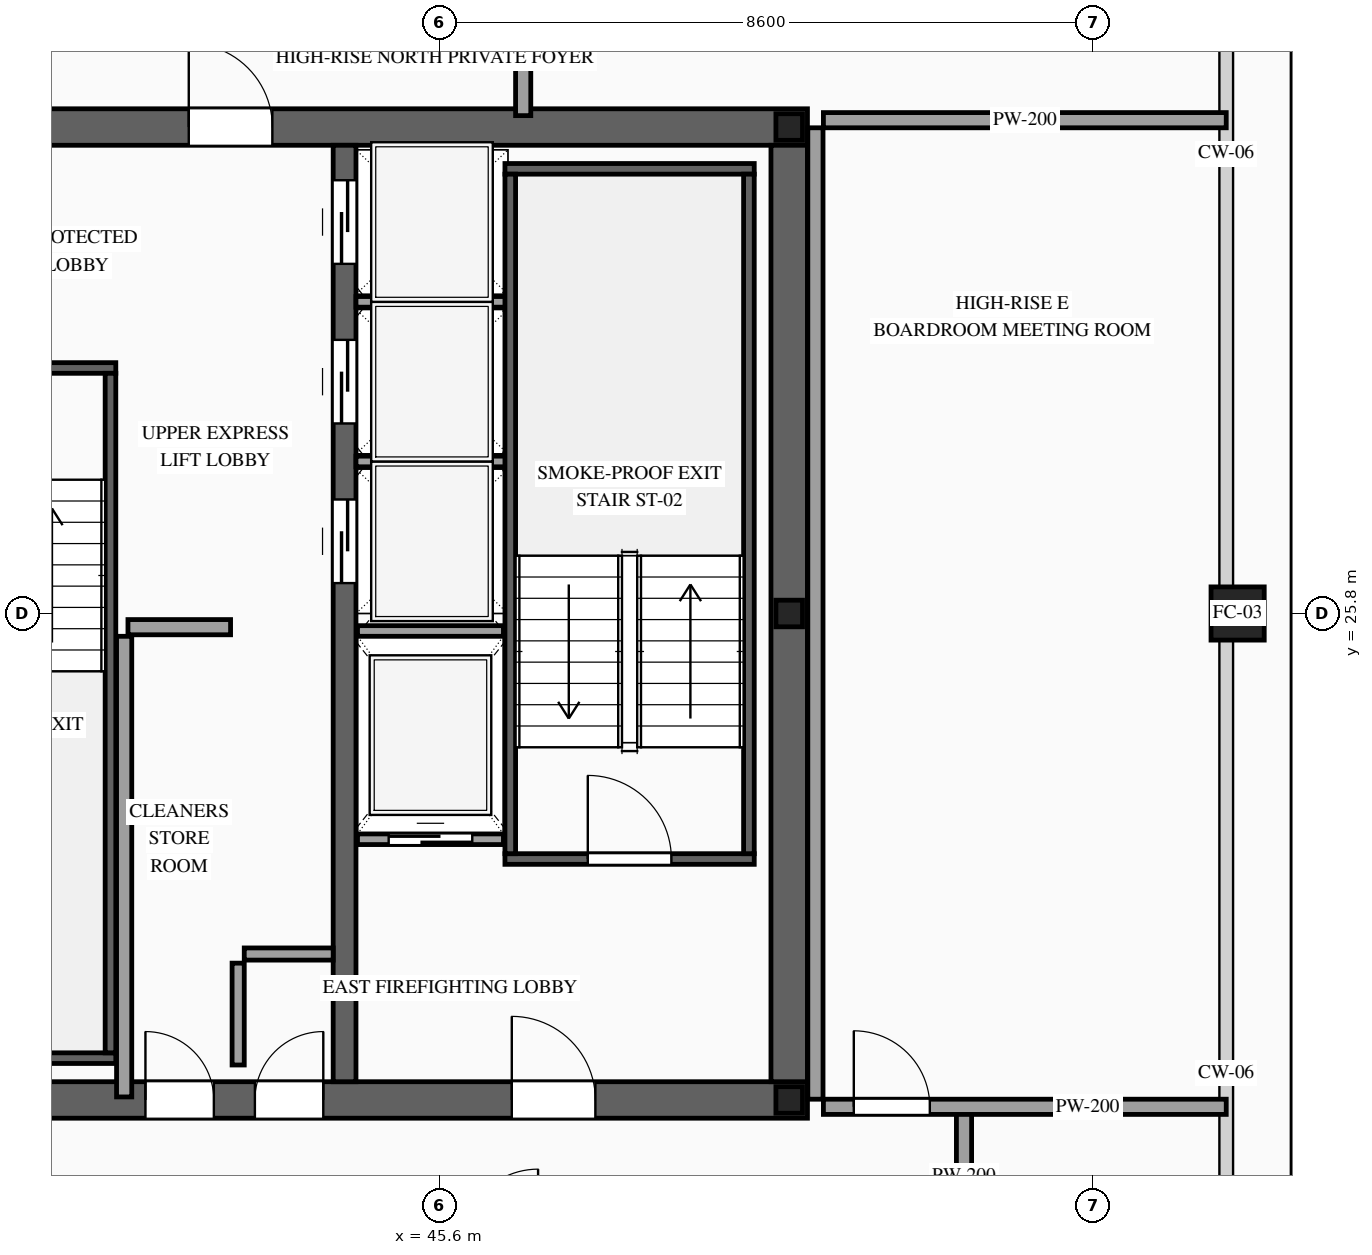
"""IFC4 building model, lengths in metres.
Left out: names, types, materials, properties, quantities, classifications, styles, units other than length and angle.
Written with IfcOpenShell. Run it as: python <this file> out.ifc"""

import sys

from ifc_helpers import new_model, si_unit, direction, frame, frame_2d, origin, origin_2d, place, context, subcontext, project, spatial, rectangle, hollow_rectangle, i_section, extrude, source, transform, mapped, element, fill, save


model = new_model("IFC4")
c1 = context("Model", 3, precision=1e-05, world=origin(), true_north=direction((0.0, 1.0)))
c2 = subcontext(c1, "Body", "Model", "MODEL_VIEW")
j1 = project(units=[si_unit("LENGTHUNIT", "METRE"), si_unit("PLANEANGLEUNIT", "RADIAN")], contexts=[c1])
p1 = place(None, origin())
s1 = spatial("IfcSite", under=j1, at=p1, CompositionType="ELEMENT")
p2 = place(p1, origin())
s2 = spatial("IfcBuilding", under=s1, at=p2, CompositionType="ELEMENT")
p3 = place(p2, frame((0.0, 0.0, 321.7)))
s3 = spatial("IfcBuildingStorey", under=s2, at=p3, CompositionType="ELEMENT", Elevation=321.7)
p4 = place(p3, frame((23.56, 19.4, 0.0), z_axis=(0.0, 0.0, 1.0), x_axis=(1.0, 0.0, 0.0)))
e1 = element("IfcWall", 1, at=p4, inside=s3, PredefinedType="SHEAR", context=c2, shape_type="SweptSolid", body=[
    extrude(rectangle(XDim=26.88, YDim=0.48, at=frame_2d((13.44, 0.0))), origin(), (0.0, 0.0, 1.0), 3.5),
])
p5 = place(p4, frame((1.89, 0.0, 0.0)))
e2 = element("IfcOpeningElement", 2, at=p5, cuts=e1, PredefinedType="OPENING", context=c2, shape_type="SweptSolid", body=[
    extrude(rectangle(XDim=1.1, YDim=2.2, at=frame_2d((0.55, 1.1))), frame((0.0, 0.255, 0.0), z_axis=(0.0, -1.0, 0.0), x_axis=(1.0, 0.0, 0.0)), (0.0, 0.0, 1.0), 0.51),
])
p6 = place(p4, frame((9.79, 0.0, 0.0)))
e3 = element("IfcOpeningElement", 3, at=p6, cuts=e1, PredefinedType="OPENING", context=c2, shape_type="SweptSolid", body=[
    extrude(rectangle(XDim=1.1, YDim=2.2, at=frame_2d((0.55, 1.1))), frame((0.0, 0.255, 0.0), z_axis=(0.0, -1.0, 0.0), x_axis=(1.0, 0.0, 0.0)), (0.0, 0.0, 1.0), 0.51),
])
p7 = place(p4, frame((22.99, 0.0, 0.0)))
e4 = element("IfcOpeningElement", 4, at=p7, cuts=e1, PredefinedType="OPENING", context=c2, shape_type="SweptSolid", body=[
    extrude(rectangle(XDim=1.1, YDim=2.2, at=frame_2d((0.55, 1.1))), frame((0.0, 0.255, 0.0), z_axis=(0.0, -1.0, 0.0), x_axis=(1.0, 0.0, 0.0)), (0.0, 0.0, 1.0), 0.51),
])
p8 = place(p4, frame((19.61, 0.0, 0.0)))
e5 = element("IfcOpeningElement", 5, at=p8, cuts=e1, PredefinedType="OPENING", context=c2, shape_type="SweptSolid", body=[
    extrude(rectangle(XDim=0.9, YDim=2.15, at=frame_2d((0.45, 1.075))), frame((0.0, 0.255, 0.0), z_axis=(0.0, -1.0, 0.0), x_axis=(1.0, 0.0, 0.0)), (0.0, 0.0, 1.0), 0.51),
])
p9 = place(p4, frame((18.17, 0.0, 0.0)))
e6 = element("IfcOpeningElement", 6, at=p9, cuts=e1, PredefinedType="OPENING", context=c2, shape_type="SweptSolid", body=[
    extrude(rectangle(XDim=0.9, YDim=2.15, at=frame_2d((0.45, 1.075))), frame((0.0, 0.255, 0.0), z_axis=(0.0, -1.0, 0.0), x_axis=(1.0, 0.0, 0.0)), (0.0, 0.0, 1.0), 0.51),
])
p10 = place(p3, frame((23.56, 32.2, 0.0), z_axis=(0.0, 0.0, 1.0), x_axis=(1.0, 0.0, 0.0)))
e7 = element("IfcWall", 7, at=p10, inside=s3, PredefinedType="SHEAR", context=c2, shape_type="SweptSolid", body=[
    extrude(rectangle(XDim=26.88, YDim=0.48, at=frame_2d((13.44, 0.0))), origin(), (0.0, 0.0, 1.0), 3.5),
])
p11 = place(p10, frame((4.51, 0.0, 0.0)))
e8 = element("IfcOpeningElement", 8, at=p11, cuts=e7, PredefinedType="OPENING", context=c2, shape_type="SweptSolid", body=[
    extrude(rectangle(XDim=0.9, YDim=2.15, at=frame_2d((0.45, 1.075))), frame((0.0, 0.255, 0.0), z_axis=(0.0, -1.0, 0.0), x_axis=(1.0, 0.0, 0.0)), (0.0, 0.0, 1.0), 0.51),
])
p12 = place(p10, frame((9.79, 0.0, 0.0)))
e9 = element("IfcOpeningElement", 9, at=p12, cuts=e7, PredefinedType="OPENING", context=c2, shape_type="SweptSolid", body=[
    extrude(rectangle(XDim=1.1, YDim=2.2, at=frame_2d((0.55, 1.1))), frame((0.0, 0.255, 0.0), z_axis=(0.0, -1.0, 0.0), x_axis=(1.0, 0.0, 0.0)), (0.0, 0.0, 1.0), 0.51),
])
p13 = place(p10, frame((15.64, 0.0, 0.0)))
e10 = element("IfcOpeningElement", 10, at=p13, cuts=e7, PredefinedType="OPENING", context=c2, shape_type="SweptSolid", body=[
    extrude(rectangle(XDim=1.1, YDim=2.2, at=frame_2d((0.55, 1.1))), frame((0.0, 0.255, 0.0), z_axis=(0.0, -1.0, 0.0), x_axis=(1.0, 0.0, 0.0)), (0.0, 0.0, 1.0), 0.51),
])
p14 = place(p10, frame((18.74, 0.0, 0.0)))
e11 = element("IfcOpeningElement", 11, at=p14, cuts=e7, PredefinedType="OPENING", context=c2, shape_type="SweptSolid", body=[
    extrude(rectangle(XDim=1.1, YDim=2.2, at=frame_2d((0.55, 1.1))), frame((0.0, 0.255, 0.0), z_axis=(0.0, -1.0, 0.0), x_axis=(1.0, 0.0, 0.0)), (0.0, 0.0, 1.0), 0.51),
])
m1 = source(origin(), c2, "Body", "SweptSolid", [
    extrude(rectangle(XDim=12.32, YDim=0.48, at=frame_2d((6.16, 0.0))), origin(), (0.0, 0.0, 1.0), 3.5),
])
p15 = place(p3, frame((50.2, 19.64, 0.0), z_axis=(0.0, 0.0, 1.0), x_axis=(0.0, 1.0, 0.0)))
e12 = element("IfcWall", 12, at=p15, inside=s3, PredefinedType="SHEAR", context=c2, shape_type="MappedRepresentation", body=[
    mapped(m1, transform((0.0, 0.0, 0.0), scale=1.0)),
])
p16 = place(p3, frame((44.35, 19.64, 0.0), z_axis=(0.0, 0.0, 1.0), x_axis=(0.0, 1.0, 0.0)))
e13 = element("IfcWall", 13, at=p16, inside=s3, PredefinedType="SOLIDWALL", context=c2, shape_type="SweptSolid", body=[
    extrude(rectangle(XDim=12.32, YDim=0.3, at=frame_2d((6.16, 0.0))), origin(), (0.0, 0.0, 1.0), 3.5),
])
p17 = place(p16, frame((6.56, 0.0, 0.0)))
e14 = element("IfcOpeningElement", 14, at=p17, cuts=e13, PredefinedType="OPENING", context=c2, shape_type="SweptSolid", body=[
    extrude(rectangle(XDim=1.1, YDim=2.2, at=frame_2d((0.55, 1.1))), frame((0.0, 0.165, 0.0), z_axis=(0.0, -1.0, 0.0), x_axis=(1.0, 0.0, 0.0)), (0.0, 0.0, 1.0), 0.33),
])
p18 = place(p16, frame((8.66, 0.0, 0.0)))
e15 = element("IfcOpeningElement", 15, at=p18, cuts=e13, PredefinedType="OPENING", context=c2, shape_type="SweptSolid", body=[
    extrude(rectangle(XDim=1.1, YDim=2.2, at=frame_2d((0.55, 1.1))), frame((0.0, 0.165, 0.0), z_axis=(0.0, -1.0, 0.0), x_axis=(1.0, 0.0, 0.0)), (0.0, 0.0, 1.0), 0.33),
])
p19 = place(p16, frame((10.76, 0.0, 0.0)))
e16 = element("IfcOpeningElement", 16, at=p19, cuts=e13, PredefinedType="OPENING", context=c2, shape_type="SweptSolid", body=[
    extrude(rectangle(XDim=1.1, YDim=2.2, at=frame_2d((0.55, 1.1))), frame((0.0, 0.165, 0.0), z_axis=(0.0, -1.0, 0.0), x_axis=(1.0, 0.0, 0.0)), (0.0, 0.0, 1.0), 0.33),
])
m2 = source(origin(), c2, "Body", "SweptSolid", [
    extrude(i_section(OverallWidth=0.35, OverallDepth=0.35, WebThickness=0.012, FlangeThickness=0.019, at=origin_2d()), origin(), (0.0, 0.0, 1.0), 3.5),
])
for number, where, z_axis, x_axis in (
    (17, (50.2, 19.4, 0.0), (0.0, 0.0, 1.0), (1.0, 0.0, 0.0)),
    (18, (50.2, 25.8, 0.0), (0.0, 0.0, 1.0), (1.0, 0.0, 0.0)),
    (19, (50.2, 32.2, 0.0), (0.0, 0.0, 1.0), (1.0, 0.0, 0.0)),
):
    element("IfcColumn", number, at=place(p3, frame(where, z_axis=z_axis, x_axis=x_axis)), inside=s3, PredefinedType="COLUMN", context=c2, shape_type="MappedRepresentation", body=[
        mapped(m2, transform((0.0, 0.0, 0.0), scale=1.0)),
    ])
m3 = source(origin(), c2, "Body", "SweptSolid", [
    extrude(hollow_rectangle(XDim=0.7, YDim=0.7, WallThickness=0.032, at=origin_2d()), origin(), (0.0, 0.0, 1.0), 3.5),
])
p20 = place(p3, frame((56.1, 25.8, 0.0), z_axis=(0.0, 0.0, 1.0), x_axis=(1.0, 0.0, 0.0)))
e20 = element("IfcColumn", 20, at=p20, inside=s3, PredefinedType="COLUMN", context=c2, shape_type="MappedRepresentation", body=[
    mapped(m3, transform((0.0, 0.0, 0.0), scale=1.0)),
])
p21 = place(p3, frame((44.52, 22.83, 0.0), z_axis=(0.0, 0.0, 1.0), x_axis=(1.0, 0.0, 0.0)))
e21 = element("IfcWall", 21, at=p21, inside=s3, PredefinedType="SOLIDWALL", context=c2, shape_type="SweptSolid", body=[
    extrude(rectangle(XDim=1.92, YDim=0.14, at=frame_2d((0.96, 0.0))), origin(), (0.0, 0.0, 1.0), 3.28),
])
p22 = place(p21, frame((0.41, 0.0, 0.0)))
e22 = element("IfcOpeningElement", 22, at=p22, cuts=e21, PredefinedType="OPENING", context=c2, shape_type="SweptSolid", body=[
    extrude(rectangle(XDim=1.1, YDim=2.2, at=frame_2d((0.55, 1.1))), frame((0.0, 0.085, 0.0), z_axis=(0.0, -1.0, 0.0), x_axis=(1.0, 0.0, 0.0)), (0.0, 0.0, 1.0), 0.17),
])
m4 = source(origin(), c2, "Body", "SweptSolid", [
    extrude(rectangle(XDim=1.92, YDim=0.14, at=frame_2d((0.96, 0.0))), origin(), (0.0, 0.0, 1.0), 3.28),
])
p23 = place(p3, frame((44.52, 25.57, 0.0), z_axis=(0.0, 0.0, 1.0), x_axis=(1.0, 0.0, 0.0)))
e23 = element("IfcWall", 23, at=p23, inside=s3, PredefinedType="SOLIDWALL", context=c2, shape_type="MappedRepresentation", body=[
    mapped(m4, transform((0.0, 0.0, 0.0), scale=1.0)),
])
m5 = source(origin(), c2, "Body", "SweptSolid", [
    extrude(rectangle(XDim=2.0, YDim=0.14, at=frame_2d((1.0, 0.0))), origin(), (0.0, 0.0, 1.0), 3.28),
])
for number, where, z_axis, x_axis in (
    (24, (44.5, 27.8, 0.0), (0.0, 0.0, 1.0), (1.0, 0.0, 0.0)),
    (25, (44.5, 29.9, 0.0), (0.0, 0.0, 1.0), (1.0, 0.0, 0.0)),
):
    element("IfcWall", number, at=place(p3, frame(where, z_axis=z_axis, x_axis=x_axis)), inside=s3, PredefinedType="SOLIDWALL", context=c2, shape_type="MappedRepresentation", body=[
        mapped(m5, transform((0.0, 0.0, 0.0), scale=1.0)),
    ])
p24 = place(p3, frame((46.46, 22.57, 0.0), z_axis=(0.0, 0.0, 1.0), x_axis=(1.0, 0.0, 0.0)))
e26 = element("IfcWall", 26, at=p24, inside=s3, PredefinedType="SOLIDWALL", context=c2, shape_type="SweptSolid", body=[
    extrude(rectangle(XDim=3.28, YDim=0.14, at=frame_2d((1.64, 0.0))), origin(), (0.0, 0.0, 1.0), 3.28),
])
p25 = place(p24, frame((1.09, 0.0, 0.0)))
e27 = element("IfcOpeningElement", 27, at=p25, cuts=e26, PredefinedType="OPENING", context=c2, shape_type="SweptSolid", body=[
    extrude(rectangle(XDim=1.1, YDim=2.2, at=frame_2d((0.55, 1.1))), frame((0.0, 0.085, 0.0), z_axis=(0.0, -1.0, 0.0), x_axis=(1.0, 0.0, 0.0)), (0.0, 0.0, 1.0), 0.17),
])
m6 = source(origin(), c2, "Body", "SweptSolid", [
    extrude(rectangle(XDim=3.28, YDim=0.14, at=frame_2d((1.64, 0.0))), origin(), (0.0, 0.0, 1.0), 3.28),
])
p26 = place(p3, frame((46.46, 31.65, 0.0), z_axis=(0.0, 0.0, 1.0), x_axis=(1.0, 0.0, 0.0)))
e28 = element("IfcWall", 28, at=p26, inside=s3, PredefinedType="SOLIDWALL", context=c2, shape_type="MappedRepresentation", body=[
    mapped(m6, transform((0.0, 0.0, 0.0), scale=1.0)),
])
m7 = source(origin(), c2, "Body", "SweptSolid", [
    extrude(rectangle(XDim=8.94, YDim=0.14, at=frame_2d((4.47, 0.0))), origin(), (0.0, 0.0, 1.0), 3.28),
])
for number, where, z_axis, x_axis in (
    (29, (46.53, 22.64, 0.0), (0.0, 0.0, 1.0), (0.0, 1.0, 0.0)),
    (30, (49.67, 22.64, 0.0), (0.0, 0.0, 1.0), (0.0, 1.0, 0.0)),
):
    element("IfcWall", number, at=place(p3, frame(where, z_axis=z_axis, x_axis=x_axis)), inside=s3, PredefinedType="SOLIDWALL", context=c2, shape_type="MappedRepresentation", body=[
        mapped(m7, transform((0.0, 0.0, 0.0), scale=1.0)),
    ])
p27 = place(p3, frame((38.2, 29.03, 0.0), z_axis=(0.0, 0.0, 1.0), x_axis=(1.0, 0.0, 0.0)))
e31 = element("IfcWall", 31, at=p27, inside=s3, PredefinedType="SOLIDWALL", context=c2, shape_type="SweptSolid", body=[
    extrude(rectangle(XDim=3.14, YDim=0.14, at=frame_2d((1.57, 0.0))), origin(), (0.0, 0.0, 1.0), 3.28),
])
p28 = place(p27, frame((1.02, 0.0, 0.0)))
e32 = element("IfcOpeningElement", 32, at=p28, cuts=e31, PredefinedType="OPENING", context=c2, shape_type="SweptSolid", body=[
    extrude(rectangle(XDim=1.1, YDim=2.2, at=frame_2d((0.55, 1.1))), frame((0.0, 0.085, 0.0), z_axis=(0.0, -1.0, 0.0), x_axis=(1.0, 0.0, 0.0)), (0.0, 0.0, 1.0), 0.17),
])
m8 = source(origin(), c2, "Body", "SweptSolid", [
    extrude(rectangle(XDim=3.14, YDim=0.14, at=frame_2d((1.57, 0.0))), origin(), (0.0, 0.0, 1.0), 3.28),
])
p29 = place(p3, frame((38.2, 19.95, 0.0), z_axis=(0.0, 0.0, 1.0), x_axis=(1.0, 0.0, 0.0)))
e33 = element("IfcWall", 33, at=p29, inside=s3, PredefinedType="SOLIDWALL", context=c2, shape_type="MappedRepresentation", body=[
    mapped(m8, transform((0.0, 0.0, 0.0), scale=1.0)),
])
m9 = source(origin(), c2, "Body", "SweptSolid", [
    extrude(rectangle(XDim=8.94, YDim=0.14, at=frame_2d((4.47, 0.0))), origin(), (0.0, 0.0, 1.0), 3.28),
])
p30 = place(p3, frame((41.27, 20.02, 0.0), z_axis=(0.0, 0.0, 1.0), x_axis=(0.0, 1.0, 0.0)))
e34 = element("IfcWall", 34, at=p30, inside=s3, PredefinedType="SOLIDWALL", context=c2, shape_type="MappedRepresentation", body=[
    mapped(m9, transform((0.0, 0.0, 0.0), scale=1.0)),
])
m10 = source(origin(), c2, "Body", "SweptSolid", [
    extrude(rectangle(XDim=1.34, YDim=0.16, at=frame_2d((0.67, 0.0))), origin(), (0.0, 0.0, 1.0), 3.28),
])
p31 = place(p3, frame((42.95, 19.86, 0.0), z_axis=(0.0, 0.0, 1.0), x_axis=(0.0, 1.0, 0.0)))
e35 = element("IfcWall", 35, at=p31, inside=s3, PredefinedType="PARTITIONING", context=c2, shape_type="MappedRepresentation", body=[
    mapped(m10, transform((0.0, 0.0, 0.0), scale=1.0)),
])
m11 = source(origin(), c2, "Body", "SweptSolid", [
    extrude(rectangle(XDim=1.17, YDim=0.16, at=frame_2d((0.585, 0.0))), origin(), (0.0, 0.0, 1.0), 3.28),
])
p32 = place(p3, frame((43.03, 21.32, 0.0), z_axis=(0.0, 0.0, 1.0), x_axis=(1.0, 0.0, 0.0)))
e36 = element("IfcWall", 36, at=p32, inside=s3, PredefinedType="PARTITIONING", context=c2, shape_type="MappedRepresentation", body=[
    mapped(m11, transform((0.0, 0.0, 0.0), scale=1.0)),
])
m12 = source(origin(), c2, "Body", "SweptSolid", [
    extrude(rectangle(XDim=6.06, YDim=0.2, at=frame_2d((3.03, 0.0))), origin(), (0.0, 0.0, 1.0), 3.28),
])
p33 = place(p3, frame((41.45, 19.44, 0.0), z_axis=(0.0, 0.0, 1.0), x_axis=(0.0, 1.0, 0.0)))
e37 = element("IfcWall", 37, at=p33, inside=s3, PredefinedType="PARTITIONING", context=c2, shape_type="MappedRepresentation", body=[
    mapped(m12, transform((0.0, 0.0, 0.0), scale=1.0)),
])
m13 = source(origin(), c2, "Body", "SweptSolid", [
    extrude(rectangle(XDim=1.35, YDim=0.2, at=frame_2d((0.675, 0.0))), origin(), (0.0, 0.0, 1.0), 3.28),
])
p34 = place(p3, frame((41.5, 25.62, 0.0), z_axis=(0.0, 0.0, 1.0), x_axis=(1.0, 0.0, 0.0)))
e38 = element("IfcWall", 38, at=p34, inside=s3, PredefinedType="PARTITIONING", context=c2, shape_type="MappedRepresentation", body=[
    mapped(m13, transform((0.0, 0.0, 0.0), scale=1.0)),
])
m14 = source(origin(), c2, "Body", "SweptSolid", [
    extrude(rectangle(XDim=1.7, YDim=0.2, at=frame_2d((0.85, 0.0))), origin(), (0.0, 0.0, 1.0), 3.28),
])
for number, where, z_axis, x_axis in (
    (39, (46.7, 32.35, 0.0), (0.0, 0.0, 1.0), (0.0, 1.0, 0.0)),
    (40, (52.5, 17.55, 0.0), (0.0, 0.0, 1.0), (0.0, 1.0, 0.0)),
):
    element("IfcWall", number, at=place(p3, frame(where, z_axis=z_axis, x_axis=x_axis)), inside=s3, PredefinedType="PARTITIONING", context=c2, shape_type="MappedRepresentation", body=[
        mapped(m14, transform((0.0, 0.0, 0.0), scale=1.0)),
    ])
p35 = place(p3, frame((50.65, 19.31, 0.0), z_axis=(0.0, 0.0, 1.0), x_axis=(1.0, 0.0, 0.0)))
e41 = element("IfcWall", 41, at=p35, inside=s3, PredefinedType="PARTITIONING", context=c2, shape_type="SweptSolid", body=[
    extrude(rectangle(XDim=5.3, YDim=0.2, at=frame_2d((2.65, 0.0))), origin(), (0.0, 0.0, 1.0), 2.825),
])
p36 = place(p35, frame((0.4, 0.0, 0.0)))
e42 = element("IfcOpeningElement", 42, at=p36, cuts=e41, PredefinedType="OPENING", context=c2, shape_type="SweptSolid", body=[
    extrude(rectangle(XDim=1.0, YDim=2.2, at=frame_2d((0.5, 1.1))), frame((0.0, 0.115, 0.0), z_axis=(0.0, -1.0, 0.0), x_axis=(1.0, 0.0, 0.0)), (0.0, 0.0, 1.0), 0.23),
])
m15 = source(origin(), c2, "Body", "SweptSolid", [
    extrude(rectangle(XDim=5.3, YDim=0.2, at=frame_2d((2.65, 0.0))), origin(), (0.0, 0.0, 1.0), 2.825),
])
p37 = place(p3, frame((50.65, 32.29, 0.0), z_axis=(0.0, 0.0, 1.0), x_axis=(1.0, 0.0, 0.0)))
e43 = element("IfcWall", 43, at=p37, inside=s3, PredefinedType="PARTITIONING", context=c2, shape_type="MappedRepresentation", body=[
    mapped(m15, transform((0.0, 0.0, 0.0), scale=1.0)),
])
m16 = source(origin(), c2, "Body", "SweptSolid", [
    extrude(rectangle(XDim=12.78, YDim=0.2, at=frame_2d((6.39, 0.0))), origin(), (0.0, 0.0, 1.0), 3.28),
])
p38 = place(p3, frame((50.545, 19.41, 0.0), z_axis=(0.0, 0.0, 1.0), x_axis=(0.0, 1.0, 0.0)))
e44 = element("IfcWall", 44, at=p38, inside=s3, PredefinedType="PARTITIONING", context=c2, shape_type="MappedRepresentation", body=[
    mapped(m16, transform((0.0, 0.0, 0.0), scale=1.0)),
])
m17 = source(origin(), c2, "Body", "SweptSolid", [
    extrude(rectangle(XDim=1.1, YDim=2.2, at=frame_2d((0.55, 1.1))), frame((0.0, 0.025, 0.0), z_axis=(0.0, -1.0, 0.0), x_axis=(1.0, 0.0, 0.0)), (0.0, 0.0, 1.0), 0.05),
])
p39 = place(p22, origin())
e45 = element("IfcDoor", 45, at=p39, inside=s3, OperationType="SLIDING_TO_RIGHT", PredefinedType="DOOR", context=c2, shape_type="MappedRepresentation", body=[
    mapped(m17, transform((0.0, 0.0, 0.0), scale=1.0)),
])
fill(e22, e45)
p40 = place(p17, origin())
e46 = element("IfcDoor", 46, at=p40, inside=s3, OperationType="SLIDING_TO_LEFT", PredefinedType="DOOR", context=c2, shape_type="MappedRepresentation", body=[
    mapped(m17, transform((0.0, 0.0, 0.0), scale=1.0)),
])
fill(e14, e46)
p41 = place(p18, origin())
e47 = element("IfcDoor", 47, at=p41, inside=s3, OperationType="SLIDING_TO_RIGHT", PredefinedType="DOOR", context=c2, shape_type="MappedRepresentation", body=[
    mapped(m17, transform((0.0, 0.0, 0.0), scale=1.0)),
])
fill(e15, e47)
p42 = place(p19, origin())
e48 = element("IfcDoor", 48, at=p42, inside=s3, OperationType="SLIDING_TO_LEFT", PredefinedType="DOOR", context=c2, shape_type="MappedRepresentation", body=[
    mapped(m17, transform((0.0, 0.0, 0.0), scale=1.0)),
])
fill(e16, e48)
m18 = source(origin(), c2, "Body", "SweptSolid", [
    extrude(rectangle(XDim=1.1, YDim=2.2, at=frame_2d((0.55, 1.1))), frame((0.0, 0.025, 0.0), z_axis=(0.0, -1.0, 0.0), x_axis=(1.0, 0.0, 0.0)), (0.0, 0.0, 1.0), 0.05),
])
p43 = place(p25, origin())
e49 = element("IfcDoor", 49, at=p43, inside=s3, OperationType="SINGLE_SWING_LEFT", PredefinedType="DOOR", context=c2, shape_type="MappedRepresentation", body=[
    mapped(m18, transform((0.0, 0.0, 0.0), scale=1.0)),
])
fill(e27, e49)
p44 = place(p7, origin())
e50 = element("IfcDoor", 50, at=p44, inside=s3, OperationType="SINGLE_SWING_LEFT", PredefinedType="DOOR", context=c2, shape_type="MappedRepresentation", body=[
    mapped(m18, transform((0.0, 0.0, 0.0), scale=1.0)),
])
fill(e4, e50)
p45 = place(p14, origin())
e51 = element("IfcDoor", 51, at=p45, inside=s3, OperationType="SINGLE_SWING_LEFT", PredefinedType="DOOR", context=c2, shape_type="MappedRepresentation", body=[
    mapped(m18, transform((0.0, 0.0, 0.0), scale=1.0)),
])
fill(e11, e51)
m19 = source(origin(), c2, "Body", "SweptSolid", [
    extrude(rectangle(XDim=0.9, YDim=2.15, at=frame_2d((0.45, 1.075))), frame((0.0, 0.025, 0.0), z_axis=(0.0, -1.0, 0.0), x_axis=(1.0, 0.0, 0.0)), (0.0, 0.0, 1.0), 0.05),
])
p46 = place(p8, origin())
e52 = element("IfcDoor", 52, at=p46, inside=s3, OperationType="SINGLE_SWING_RIGHT", PredefinedType="DOOR", context=c2, shape_type="MappedRepresentation", body=[
    mapped(m19, transform((0.0, 0.0, 0.0), scale=1.0)),
])
fill(e5, e52)
p47 = place(p9, origin())
e53 = element("IfcDoor", 53, at=p47, inside=s3, OperationType="SINGLE_SWING_LEFT", PredefinedType="DOOR", context=c2, shape_type="MappedRepresentation", body=[
    mapped(m19, transform((0.0, 0.0, 0.0), scale=1.0)),
])
fill(e6, e53)
m20 = source(origin(), c2, "Body", "SweptSolid", [
    extrude(rectangle(XDim=1.0, YDim=2.2, at=frame_2d((0.5, 1.1))), frame((0.0, 0.025, 0.0), z_axis=(0.0, -1.0, 0.0), x_axis=(1.0, 0.0, 0.0)), (0.0, 0.0, 1.0), 0.05),
])
p48 = place(p36, origin())
e54 = element("IfcDoor", 54, at=p48, inside=s3, OperationType="SINGLE_SWING_LEFT", PredefinedType="DOOR", context=c2, shape_type="MappedRepresentation", body=[
    mapped(m20, transform((0.0, 0.0, 0.0), scale=1.0)),
])
fill(e42, e54)
save(model, sys.argv[1])
